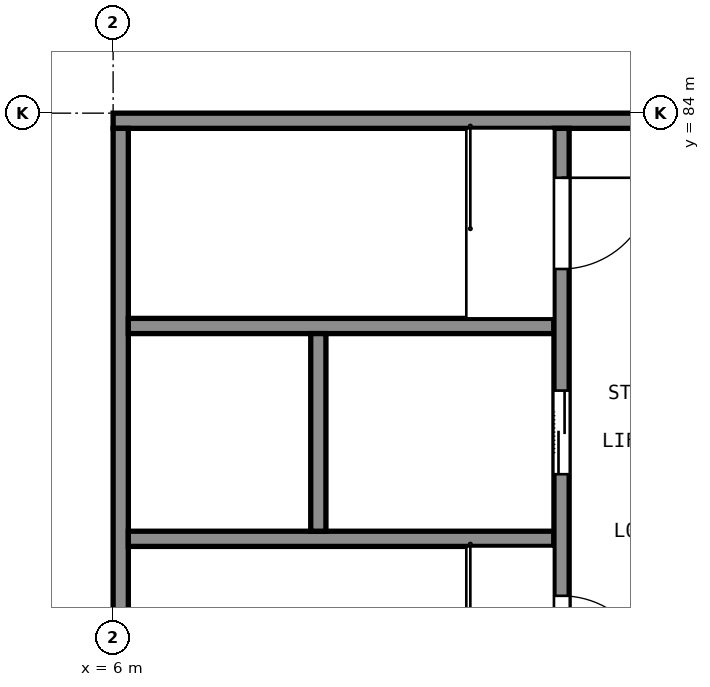
"""IFC4 building model, lengths in metres.
Left out: names, types, materials, properties, quantities, classifications, styles, units other than length and angle.
Written with IfcOpenShell. Run it as: python <this file> out.ifc"""

import sys

from ifc_helpers import new_model, si_unit, direction, frame, frame_2d, origin, place, context, subcontext, project, spatial, polyline, rectangle, outline, extrude, element, fill, save


model = new_model("IFC4")
c1 = context("Model", 3, precision=1e-05, world=origin(), true_north=direction((0.0, 1.0)))
c2 = subcontext(c1, "Body", "Model", "MODEL_VIEW")
j1 = project(units=[si_unit("LENGTHUNIT", "METRE"), si_unit("PLANEANGLEUNIT", "RADIAN")], contexts=[c1])
p1 = place(None, origin())
s1 = spatial("IfcSite", under=j1, at=p1, CompositionType="ELEMENT")
p2 = place(p1, origin())
s2 = spatial("IfcBuilding", under=s1, at=p2, CompositionType="ELEMENT")
p3 = place(p2, frame((0.0, 0.0, 5.5)))
s3 = spatial("IfcBuildingStorey", under=s2, at=p3, CompositionType="ELEMENT", Elevation=5.5)
p4 = place(p3, frame((6.0, 83.9, 0.0), z_axis=(0.0, 0.0, 1.0), x_axis=(1.0, 0.0, 0.0)))
e1 = element("IfcWall", 1, at=p4, inside=s3, PredefinedType="SHEAR", context=c2, shape_type="SweptSolid", body=[
    extrude(rectangle(XDim=8.4, YDim=0.2, at=frame_2d((4.2, 0.0))), origin(), (0.0, 0.0, 1.0), 7.7),
])
p5 = place(p3, frame((6.1, 75.8, 0.0), z_axis=(0.0, 0.0, 1.0), x_axis=(0.0, 1.0, 0.0)))
e2 = element("IfcWall", 2, at=p5, inside=s3, PredefinedType="SHEAR", context=c2, shape_type="SweptSolid", body=[
    extrude(outline(polyline([(0.0, 0.0), (8.0, 0.0), (8.0, 7.674), (7.407, 7.524), (7.111, 7.45), (0.889, 5.875), (0.593, 5.801), (0.0, 5.651), (0.0, 0.0)])), frame((0.0, 0.1, 0.0), z_axis=(0.0, -1.0, 0.0), x_axis=(1.0, 0.0, 0.0)), (0.0, 0.0, 1.0), 0.2),
])
p6 = place(p3, frame((11.9, 75.8, 0.0), z_axis=(0.0, 0.0, 1.0), x_axis=(0.0, 1.0, 0.0)))
e3 = element("IfcWall", 3, at=p6, inside=s3, PredefinedType="SHEAR", context=c2, shape_type="SweptSolid", body=[
    extrude(outline(polyline([(0.0, 0.0), (8.0, 0.0), (8.0, 7.674), (7.407, 7.524), (7.111, 7.45), (0.889, 5.875), (0.593, 5.801), (0.0, 5.651), (0.0, 0.0)])), frame((0.0, 0.1, 0.0), z_axis=(0.0, -1.0, 0.0), x_axis=(1.0, 0.0, 0.0)), (0.0, 0.0, 1.0), 0.2),
])
p7 = place(p6, frame((0.65, 0.0, 0.0)))
e4 = element("IfcOpeningElement", 4, at=p7, cuts=e3, PredefinedType="OPENING", context=c2, shape_type="SweptSolid", body=[
    extrude(rectangle(XDim=1.2, YDim=2.1, at=frame_2d((0.6, 1.05))), frame((0.0, 0.11, 0.0), z_axis=(0.0, -1.0, 0.0), x_axis=(1.0, 0.0, 0.0)), (0.0, 0.0, 1.0), 0.22),
])
p8 = place(p6, frame((6.15, 0.0, 0.0)))
e5 = element("IfcOpeningElement", 5, at=p8, cuts=e3, PredefinedType="OPENING", context=c2, shape_type="SweptSolid", body=[
    extrude(rectangle(XDim=1.2, YDim=2.1, at=frame_2d((0.6, 1.05))), frame((0.0, 0.11, 0.0), z_axis=(0.0, -1.0, 0.0), x_axis=(1.0, 0.0, 0.0)), (0.0, 0.0, 1.0), 0.22),
])
p9 = place(p6, frame((3.45, 0.0, 0.0)))
e6 = element("IfcOpeningElement", 6, at=p9, cuts=e3, PredefinedType="OPENING", context=c2, shape_type="SweptSolid", body=[
    extrude(rectangle(XDim=1.1, YDim=2.1, at=frame_2d((0.55, 1.05))), frame((0.0, 0.11, 0.0), z_axis=(0.0, -1.0, 0.0), x_axis=(1.0, 0.0, 0.0)), (0.0, 0.0, 1.0), 0.22),
])
p10 = place(p3, frame((6.2, 78.4, 0.0), z_axis=(0.0, 0.0, 1.0), x_axis=(1.0, 0.0, 0.0)))
e7 = element("IfcWall", 7, at=p10, inside=s3, PredefinedType="SHEAR", context=c2, shape_type="SweptSolid", body=[
    extrude(rectangle(XDim=5.6, YDim=0.2, at=frame_2d((2.8, 0.0))), origin(), (0.0, 0.0, 1.0), 6.308),
])
p11 = place(p3, frame((6.2, 81.2, 0.0), z_axis=(0.0, 0.0, 1.0), x_axis=(1.0, 0.0, 0.0)))
e8 = element("IfcWall", 8, at=p11, inside=s3, PredefinedType="SHEAR", context=c2, shape_type="SweptSolid", body=[
    extrude(rectangle(XDim=5.6, YDim=0.2, at=frame_2d((2.8, 0.0))), origin(), (0.0, 0.0, 1.0), 7.018),
])
p12 = place(p3, frame((8.7, 78.5, 0.0), z_axis=(0.0, 0.0, 1.0), x_axis=(0.0, 1.0, 0.0)))
e9 = element("IfcWall", 9, at=p12, inside=s3, PredefinedType="SHEAR", context=c2, shape_type="SweptSolid", body=[
    extrude(outline(polyline([(0.0, 0.0), (2.6, 0.0), (2.6, 6.991), (0.0, 6.334), (0.0, 0.0)])), frame((0.0, 0.1, 0.0), z_axis=(0.0, -1.0, 0.0), x_axis=(1.0, 0.0, 0.0)), (0.0, 0.0, 1.0), 0.2),
])
p13 = place(p7, origin())
e10 = element("IfcDoor", 10, at=p13, inside=s3, OperationType="SINGLE_SWING_LEFT", PredefinedType="DOOR", context=c2, shape_type="SweptSolid", body=[
    extrude(rectangle(XDim=1.2, YDim=2.1, at=frame_2d((0.6, 1.05))), frame((0.0, 0.025, 0.0), z_axis=(0.0, -1.0, 0.0), x_axis=(1.0, 0.0, 0.0)), (0.0, 0.0, 1.0), 0.05),
])
fill(e4, e10)
p14 = place(p8, origin())
e11 = element("IfcDoor", 11, at=p14, inside=s3, OperationType="SINGLE_SWING_RIGHT", PredefinedType="DOOR", context=c2, shape_type="SweptSolid", body=[
    extrude(rectangle(XDim=1.2, YDim=2.1, at=frame_2d((0.6, 1.05))), frame((0.0, 0.025, 0.0), z_axis=(0.0, -1.0, 0.0), x_axis=(1.0, 0.0, 0.0)), (0.0, 0.0, 1.0), 0.05),
])
fill(e5, e11)
p15 = place(p9, origin())
e12 = element("IfcDoor", 12, at=p15, inside=s3, OperationType="DOUBLE_DOOR_SLIDING", PredefinedType="DOOR", context=c2, shape_type="SweptSolid", body=[
    extrude(rectangle(XDim=1.1, YDim=2.1, at=frame_2d((0.55, 1.05))), frame((0.0, 0.025, 0.0), z_axis=(0.0, -1.0, 0.0), x_axis=(1.0, 0.0, 0.0)), (0.0, 0.0, 1.0), 0.05),
])
fill(e6, e12)
save(model, sys.argv[1])
